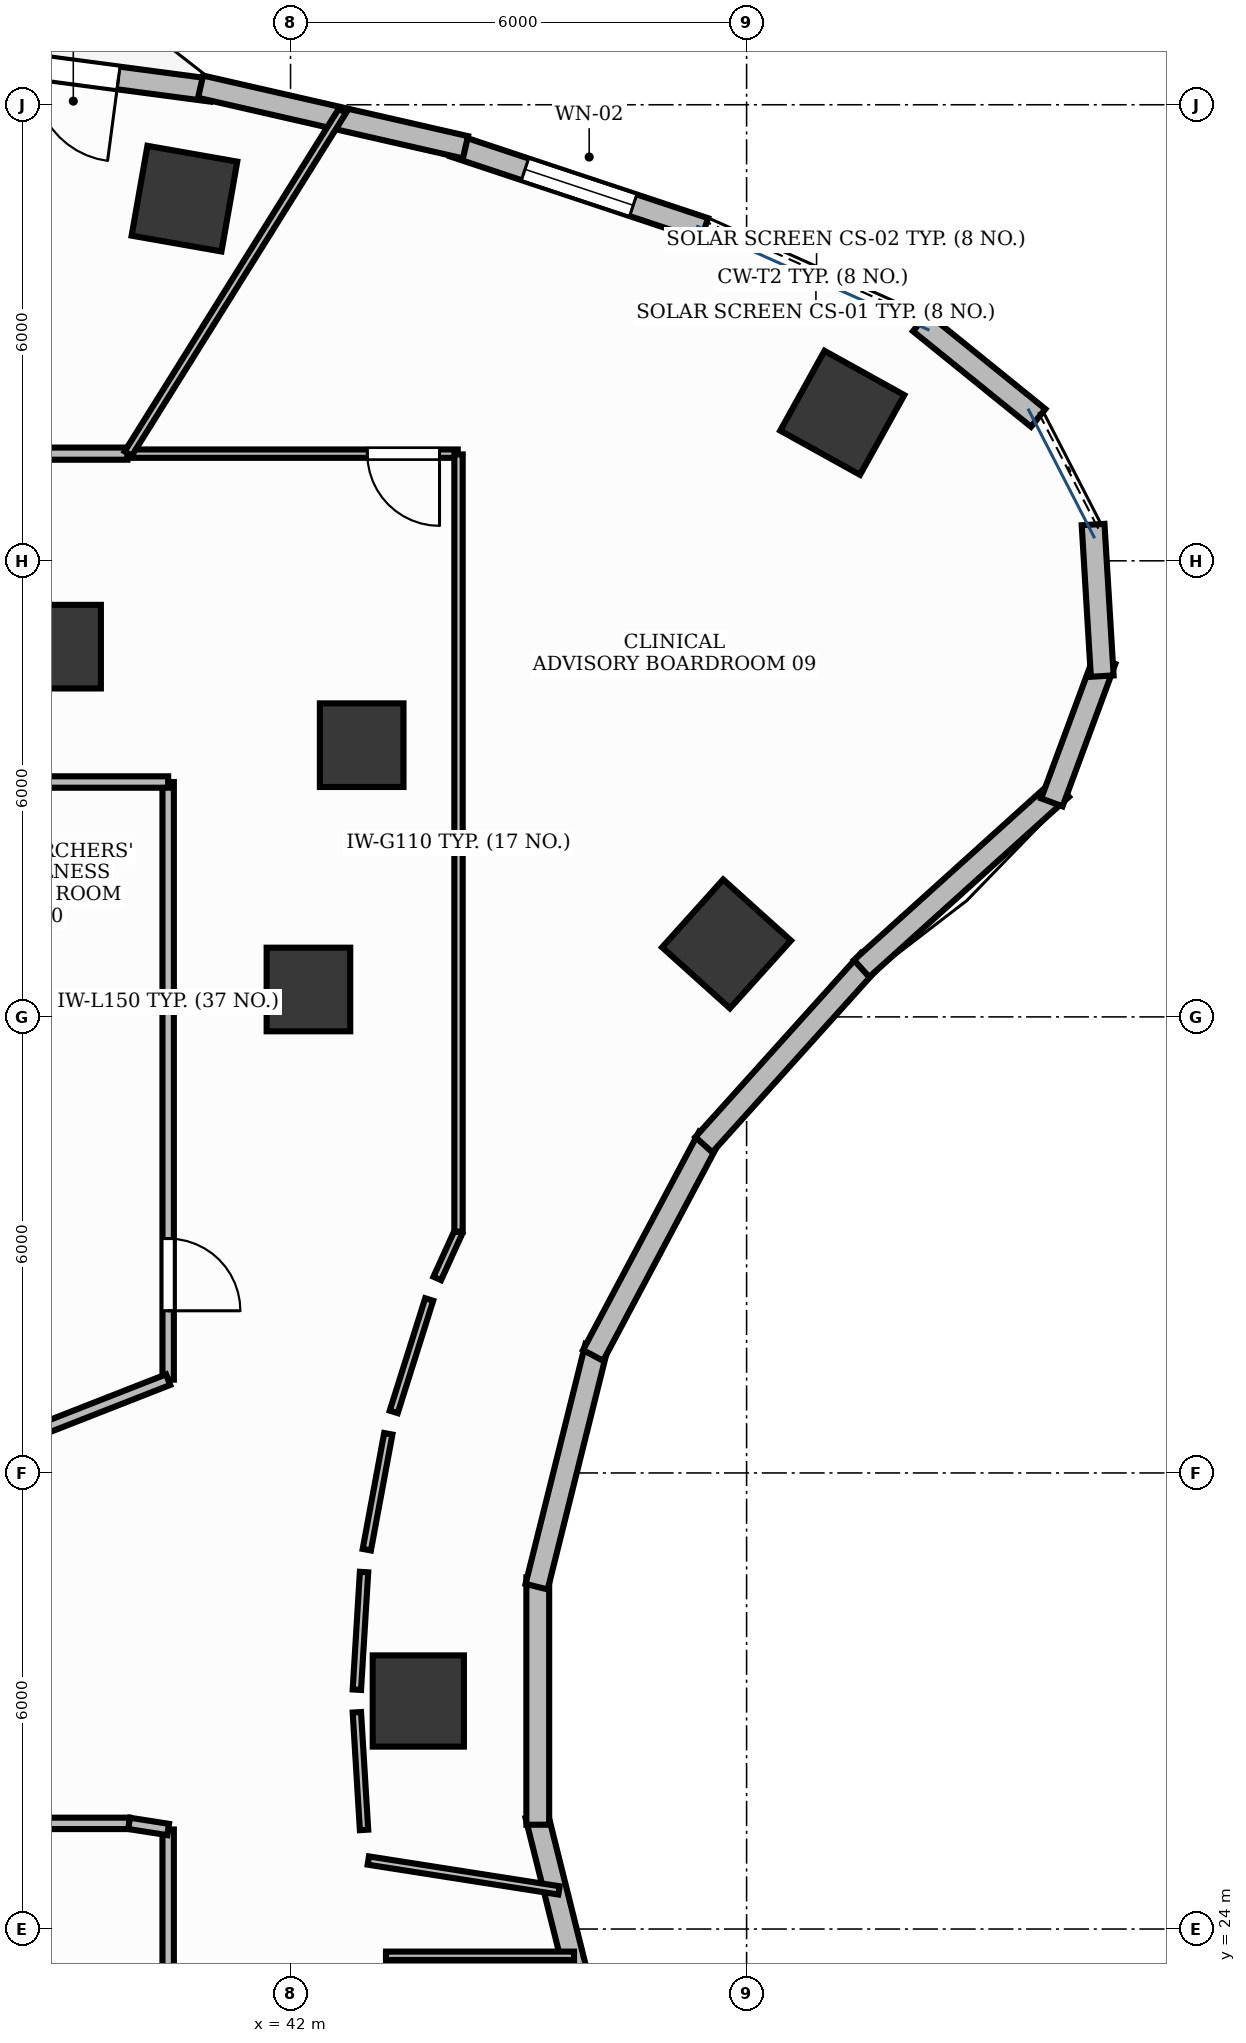
"""IFC4 building model, lengths in metres.
Left out: names, types, materials, properties, quantities, classifications, styles, units other than length and angle.
Written with IfcOpenShell. Run it as: python <this file> out.ifc"""

import sys

from ifc_helpers import new_model, si_unit, direction, frame, frame_2d, origin, origin_2d, place, context, subcontext, project, spatial, rectangle, extrude, element, fill, save


model = new_model("IFC4")
c1 = context("Model", 3, precision=1e-05, world=origin(), true_north=direction((0.0, 1.0)))
c2 = subcontext(c1, "Body", "Model", "MODEL_VIEW")
j1 = project(units=[si_unit("LENGTHUNIT", "METRE"), si_unit("PLANEANGLEUNIT", "RADIAN")], contexts=[c1])
p1 = place(None, origin())
s1 = spatial("IfcSite", under=j1, at=p1, CompositionType="ELEMENT")
p2 = place(p1, origin())
s2 = spatial("IfcBuilding", under=s1, at=p2, CompositionType="ELEMENT")
p3 = place(p2, frame((0.0, 0.0, 115.2)))
s3 = spatial("IfcBuildingStorey", under=s2, at=p3, CompositionType="ELEMENT", Elevation=115.2)
p4 = place(p3, frame((49.259, 43.947, -0.0), z_axis=(0.0, 0.0, 1.0), x_axis=(-0.874535078577, 0.484962262797, 0.0)))
e1 = element("IfcColumn", 1, at=p4, inside=s3, PredefinedType="COLUMN", context=c2, shape_type="SweptSolid", body=[
    extrude(rectangle(XDim=1.2, YDim=1.2, at=origin_2d()), origin(), (0.0, 0.0, 1.0), 3.901),
])
p5 = place(p3, frame((42.936, 39.575, -0.0), z_axis=(0.0, 0.0, 1.0), x_axis=(1.0, 0.0, 0.0)))
e2 = element("IfcColumn", 2, at=p5, inside=s3, PredefinedType="COLUMN", context=c2, shape_type="SweptSolid", body=[
    extrude(rectangle(XDim=1.1, YDim=1.1, at=origin_2d()), origin(), (0.0, 0.0, 1.0), 3.901),
])
p6 = place(p3, frame((40.604, 46.765, -0.0), z_axis=(0.0, 0.0, 1.0), x_axis=(-0.984868307662, 0.173304404339, 0.0)))
e3 = element("IfcColumn", 3, at=p6, inside=s3, PredefinedType="COLUMN", context=c2, shape_type="SweptSolid", body=[
    extrude(rectangle(XDim=1.2, YDim=1.2, at=origin_2d()), origin(), (0.0, 0.0, 1.0), 3.901),
])
p7 = place(p3, frame((38.955, 40.871, -0.0), z_axis=(0.0, 0.0, 1.0), x_axis=(1.0, 0.0, 0.0)))
e4 = element("IfcColumn", 4, at=p7, inside=s3, PredefinedType="COLUMN", context=c2, shape_type="SweptSolid", body=[
    extrude(rectangle(XDim=1.1, YDim=1.1, at=origin_2d()), origin(), (0.0, 0.0, 1.0), 3.901),
])
for number, where, z_axis, x_axis in (
    (5, (43.681, 27.0, -0.0), (0.0, 0.0, 1.0), (0.0, 1.0, 0.0)),
    (6, (47.736, 36.96, -0.0), (0.0, 0.0, 1.0), (0.669, 0.743, 0.0)),
):
    element("IfcColumn", number, at=place(p3, frame(where, z_axis=z_axis, x_axis=x_axis)), inside=s3, PredefinedType="COLUMN", context=c2, shape_type="SweptSolid", body=[
        extrude(rectangle(XDim=1.2, YDim=1.2, at=origin_2d()), origin(), (0.0, 0.0, 1.0), 3.901),
    ])
p8 = place(p3, frame((42.236, 36.361, -0.0), z_axis=(0.0, 0.0, 1.0), x_axis=(1.0, 0.0, 0.0)))
e7 = element("IfcColumn", 7, at=p8, inside=s3, PredefinedType="COLUMN", context=c2, shape_type="SweptSolid", body=[
    extrude(rectangle(XDim=1.1, YDim=1.1, at=origin_2d()), origin(), (0.0, 0.0, 1.0), 3.901),
])
p9 = place(p3, frame((47.446, 46.366, 0.0), z_axis=(0.0, 0.0, 1.0), x_axis=(-0.948949854506, 0.315426970364, 0.0)))
e8 = element("IfcWall", 8, at=p9, inside=s3, PredefinedType="STANDARD", context=c2, shape_type="SweptSolid", body=[
    extrude(rectangle(XDim=3.476, YDim=0.3, at=frame_2d((1.738, 0.0))), origin(), (0.0, 0.0, 1.0), 3.9),
])
p10 = place(p9, frame((0.988, 0.0, 0.95)))
e9 = element("IfcOpeningElement", 9, at=p10, cuts=e8, PredefinedType="OPENING", context=c2, shape_type="SweptSolid", body=[
    extrude(rectangle(XDim=1.5, YDim=1.8, at=frame_2d((0.75, 0.9))), frame((0.0, 0.165, 0.0), z_axis=(0.0, -1.0, 0.0), x_axis=(1.0, 0.0, 0.0)), (0.0, 0.0, 1.0), 0.33),
])
p11 = place(p3, frame((40.964, 48.19, 0.0), z_axis=(0.0, 0.0, 1.0), x_axis=(-0.991369257822, 0.131099178664, 0.0)))
e10 = element("IfcWall", 10, at=p11, inside=s3, PredefinedType="STANDARD", context=c2, shape_type="SweptSolid", body=[
    extrude(rectangle(XDim=3.575, YDim=0.3, at=frame_2d((1.788, 0.0))), origin(), (0.0, 0.0, 1.0), 3.9),
])
p12 = place(p11, frame((1.238, 0.0, 0.0)))
e11 = element("IfcOpeningElement", 11, at=p12, cuts=e10, PredefinedType="OPENING", context=c2, shape_type="SweptSolid", body=[
    extrude(rectangle(XDim=1.1, YDim=2.15, at=frame_2d((0.55, 1.075))), frame((0.0, 0.165, 0.0), z_axis=(0.0, -1.0, 0.0), x_axis=(1.0, 0.0, 0.0)), (0.0, 0.0, 1.0), 0.33),
])
p13 = place(p3, frame((44.302, 47.441, 0.0), z_axis=(0.0, 0.0, 1.0), x_axis=(-0.974841550422, 0.222898971669, 0.0)))
e12 = element("IfcWall", 12, at=p13, inside=s3, PredefinedType="STANDARD", context=c2, shape_type="SweptSolid", body=[
    extrude(rectangle(XDim=3.575, YDim=0.3, at=frame_2d((1.788, 0.0))), origin(), (0.0, 0.0, 1.0), 3.9),
])
p14 = place(p3, frame((46.025, 22.337, 0.0), z_axis=(0.0, 0.0, 1.0), x_axis=(-0.241900409149, 0.970301083197, 0.0)))
e13 = element("IfcWall", 13, at=p14, inside=s3, PredefinedType="STANDARD", context=c2, shape_type="SweptSolid", body=[
    extrude(rectangle(XDim=3.256, YDim=0.3, at=frame_2d((1.628, 0.0))), origin(), (0.0, 0.0, 1.0), 3.9),
])
p15 = place(p3, frame((45.253, 25.372, 0.0), z_axis=(0.0, 0.0, 1.0), x_axis=(0.0, 1.0, 0.0)))
e14 = element("IfcWall", 14, at=p15, inside=s3, PredefinedType="STANDARD", context=c2, shape_type="SweptSolid", body=[
    extrude(rectangle(XDim=3.255, YDim=0.3, at=frame_2d((1.628, 0.0))), origin(), (0.0, 0.0, 1.0), 3.9),
])
p16 = place(p3, frame((45.238, 28.504, 0.0), z_axis=(0.0, 0.0, 1.0), x_axis=(0.241900409149, 0.970301083197, 0.0)))
e15 = element("IfcWall", 15, at=p16, inside=s3, PredefinedType="STANDARD", context=c2, shape_type="SweptSolid", body=[
    extrude(rectangle(XDim=3.256, YDim=0.3, at=frame_2d((1.628, 0.0))), origin(), (0.0, 0.0, 1.0), 3.9),
])
p17 = place(p3, frame((45.98, 31.547, 0.0), z_axis=(0.0, 0.0, 1.0), x_axis=(0.469451284634, 0.882958374645, 0.0)))
e16 = element("IfcWall", 16, at=p17, inside=s3, PredefinedType="STANDARD", context=c2, shape_type="SweptSolid", body=[
    extrude(rectangle(XDim=3.256, YDim=0.3, at=frame_2d((1.628, 0.0))), origin(), (0.0, 0.0, 1.0), 3.9),
])
p18 = place(p3, frame((47.437, 34.319, 0.0), z_axis=(0.0, 0.0, 1.0), x_axis=(0.669167727967, 0.743111399353, 0.0)))
e17 = element("IfcWall", 17, at=p18, inside=s3, PredefinedType="STANDARD", context=c2, shape_type="SweptSolid", body=[
    extrude(rectangle(XDim=3.255, YDim=0.3, at=frame_2d((1.628, 0.0))), origin(), (0.0, 0.0, 1.0), 3.9),
])
p19 = place(p3, frame((49.513, 36.636, 0.0), z_axis=(0.0, 0.0, 1.0), x_axis=(0.74255963233, 0.669779958221, 0.0)))
e18 = element("IfcWall", 18, at=p19, inside=s3, PredefinedType="STANDARD", context=c2, shape_type="SweptSolid", body=[
    extrude(rectangle(XDim=3.539, YDim=0.3, at=frame_2d((1.77, 0.0))), origin(), (0.0, 0.0, 1.0), 3.9),
])
p20 = place(p3, frame((52.016, 38.822, 0.0), z_axis=(0.0, 0.0, 1.0), x_axis=(0.347370087337, 0.937728117539, 0.0)))
e19 = element("IfcWall", 19, at=p20, inside=s3, PredefinedType="STANDARD", context=c2, shape_type="SweptSolid", body=[
    extrude(rectangle(XDim=1.997, YDim=0.3, at=frame_2d((0.999, 0.0))), origin(), (0.0, 0.0, 1.0), 3.9),
])
for number, where, z_axis, x_axis in (
    (20, (52.679, 40.483, 0.0), (0.0, 0.0, 1.0), (-0.06, 0.998, 0.0)),
    (21, (51.836, 43.881, 0.0), (0.0, 0.0, 1.0), (-0.777, 0.629, 0.0)),
):
    element("IfcWall", number, at=place(p3, frame(where, z_axis=z_axis, x_axis=x_axis)), inside=s3, PredefinedType="STANDARD", context=c2, shape_type="SweptSolid", body=[
        extrude(rectangle(XDim=1.998, YDim=0.3, at=frame_2d((0.999, 0.0))), origin(), (0.0, 0.0, 1.0), 3.9),
    ])
p21 = place(p3, frame((40.39, 25.31, 0.0), z_axis=(0.0, 0.0, 1.0), x_axis=(0.0, -1.0, 0.0)))
e22 = element("IfcWall", 22, at=p21, inside=s3, PredefinedType="PARTITIONING", context=c2, shape_type="SweptSolid", body=[
    extrude(rectangle(XDim=5.552, YDim=0.15, at=frame_2d((2.776, 0.0))), origin(), (0.0, 0.0, 1.0), 2.91),
])
p22 = place(p21, frame((1.882, 0.0, 0.0)))
e23 = element("IfcOpeningElement", 23, at=p22, cuts=e22, PredefinedType="OPENING", context=c2, shape_type="SweptSolid", body=[
    extrude(rectangle(XDim=0.95, YDim=2.15, at=frame_2d((0.475, 1.075))), frame((0.0, 0.09, 0.0), z_axis=(0.0, -1.0, 0.0), x_axis=(1.0, 0.0, 0.0)), (0.0, 0.0, 1.0), 0.18),
])
p23 = place(p3, frame((44.2, 43.41, 0.0), z_axis=(0.0, 0.0, 1.0), x_axis=(-1.0, 0.0, 0.0)))
e24 = element("IfcWall", 24, at=p23, inside=s3, PredefinedType="MOVABLE", context=c2, shape_type="SweptSolid", body=[
    extrude(rectangle(XDim=4.336, YDim=0.11, at=frame_2d((2.168, 0.0))), origin(), (0.0, 0.0, 1.0), 2.91),
])
p24 = place(p23, frame((0.24, 0.0, 0.0)))
e25 = element("IfcOpeningElement", 25, at=p24, cuts=e24, PredefinedType="OPENING", context=c2, shape_type="SweptSolid", body=[
    extrude(rectangle(XDim=0.95, YDim=2.15, at=frame_2d((0.475, 1.075))), frame((0.0, 0.07, 0.0), z_axis=(0.0, -1.0, 0.0), x_axis=(1.0, 0.0, 0.0)), (0.0, 0.0, 1.0), 0.14),
])
p25 = place(p3, frame((40.39, 39.09, 0.0), z_axis=(0.0, 0.0, 1.0), x_axis=(0.0, -1.0, 0.0)))
e26 = element("IfcWall", 26, at=p25, inside=s3, PredefinedType="PARTITIONING", context=c2, shape_type="SweptSolid", body=[
    extrude(rectangle(XDim=7.862, YDim=0.15, at=frame_2d((3.931, 0.0))), origin(), (0.0, 0.0, 1.0), 2.91),
])
p26 = place(p25, frame((6.006, 0.0, 0.0)))
e27 = element("IfcOpeningElement", 27, at=p26, cuts=e26, PredefinedType="OPENING", context=c2, shape_type="SweptSolid", body=[
    extrude(rectangle(XDim=0.95, YDim=2.15, at=frame_2d((0.475, 1.075))), frame((0.0, 0.09, 0.0), z_axis=(0.0, -1.0, 0.0), x_axis=(1.0, 0.0, 0.0)), (0.0, 0.0, 1.0), 0.18),
])
p27 = place(p3, frame((39.854, 43.41, 0.0), z_axis=(0.0, 0.0, 1.0), x_axis=(-1.0, 0.0, 0.0)))
e28 = element("IfcWall", 28, at=p27, inside=s3, PredefinedType="PARTITIONING", context=c2, shape_type="SweptSolid", body=[
    extrude(rectangle(XDim=19.812, YDim=0.16, at=frame_2d((9.906, 0.0))), origin(), (0.0, 0.0, 1.0), 2.91),
])
p28 = place(p27, frame((5.642, 0.0, 0.0)))
e29 = element("IfcOpeningElement", 29, at=p28, cuts=e28, PredefinedType="OPENING", context=c2, shape_type="SweptSolid", body=[
    extrude(rectangle(XDim=0.95, YDim=2.15, at=frame_2d((0.475, 1.075))), frame((0.0, 0.095, 0.0), z_axis=(0.0, -1.0, 0.0), x_axis=(1.0, 0.0, 0.0)), (0.0, 0.0, 1.0), 0.19),
])
p29 = place(p3, frame((43.256, 23.648, 0.0), z_axis=(0.0, 0.0, 1.0), x_axis=(1.0, 0.0, 0.0)))
e30 = element("IfcWall", 30, at=p29, inside=s3, PredefinedType="MOVABLE", context=c2, shape_type="SweptSolid", body=[
    extrude(rectangle(XDim=2.474, YDim=0.11, at=frame_2d((1.237, 0.0))), origin(), (0.0, 0.0, 1.0), 2.91),
])
p30 = place(p3, frame((37.502, 25.39, 0.0), z_axis=(0.0, 0.0, 1.0), x_axis=(1.0, 0.0, 0.0)))
e31 = element("IfcWall", 31, at=p30, inside=s3, PredefinedType="PARTITIONING", context=c2, shape_type="SweptSolid", body=[
    extrude(rectangle(XDim=2.374, YDim=0.15, at=frame_2d((1.187, 0.0))), origin(), (0.0, 0.0, 1.0), 2.91),
])
p31 = place(p3, frame((39.876, 25.39, 0.0), z_axis=(0.0, 0.0, 1.0), x_axis=(0.988005321265, -0.15441983406, 0.0)))
e32 = element("IfcWall", 32, at=p31, inside=s3, PredefinedType="PARTITIONING", context=c2, shape_type="SweptSolid", body=[
    extrude(rectangle(XDim=0.52, YDim=0.15, at=frame_2d((0.26, 0.0))), origin(), (0.0, 0.0, 1.0), 2.91),
])
p32 = place(p3, frame((45.532, 24.508, 0.0), z_axis=(0.0, 0.0, 1.0), x_axis=(-0.987957888296, 0.154723013653, 0.0)))
e33 = element("IfcWall", 33, at=p32, inside=s3, PredefinedType="MOVABLE", context=c2, shape_type="SweptSolid", body=[
    extrude(rectangle(XDim=2.539, YDim=0.11, at=frame_2d((1.27, 0.0))), origin(), (0.0, 0.0, 1.0), 2.91),
])
for number, where, z_axis, x_axis in (
    (34, (42.967, 25.304, 0.0), (0.0, 0.0, 1.0), (-0.061, 0.998, 0.0)),
    (35, (42.873, 27.149, 0.0), (0.0, 0.0, 1.0), (0.061, 0.998, 0.0)),
):
    element("IfcWall", number, at=place(p3, frame(where, z_axis=z_axis, x_axis=x_axis)), inside=s3, PredefinedType="MOVABLE", context=c2, shape_type="SweptSolid", body=[
        extrude(rectangle(XDim=1.55, YDim=0.11, at=frame_2d((0.775, 0.0))), origin(), (0.0, 0.0, 1.0), 2.91),
    ])
p33 = place(p3, frame((43.003, 28.991, 0.0), z_axis=(0.0, 0.0, 1.0), x_axis=(0.182168192784, 0.983267384559, 0.0)))
e36 = element("IfcWall", 36, at=p33, inside=s3, PredefinedType="MOVABLE", context=c2, shape_type="SweptSolid", body=[
    extrude(rectangle(XDim=1.551, YDim=0.11, at=frame_2d((0.775, 0.0))), origin(), (0.0, 0.0, 1.0), 2.91),
])
p34 = place(p3, frame((43.358, 30.803, 0.0), z_axis=(0.0, 0.0, 1.0), x_axis=(0.300641414783, 0.953737248783, 0.0)))
e37 = element("IfcWall", 37, at=p34, inside=s3, PredefinedType="MOVABLE", context=c2, shape_type="SweptSolid", body=[
    extrude(rectangle(XDim=1.55, YDim=0.11, at=frame_2d((0.775, 0.0))), origin(), (0.0, 0.0, 1.0), 2.91),
])
p35 = place(p3, frame((43.93, 32.559, 0.0), z_axis=(0.0, 0.0, 1.0), x_axis=(0.414377467152, 0.910105111905, 0.0)))
e38 = element("IfcWall", 38, at=p35, inside=s3, PredefinedType="MOVABLE", context=c2, shape_type="SweptSolid", body=[
    extrude(rectangle(XDim=0.672, YDim=0.11, at=frame_2d((0.336, 0.0))), origin(), (0.0, 0.0, 1.0), 2.91),
])
p36 = place(p3, frame((44.21, 33.175, 0.0), z_axis=(0.0, 0.0, 1.0), x_axis=(0.0, 1.0, 0.0)))
e39 = element("IfcWall", 39, at=p36, inside=s3, PredefinedType="MOVABLE", context=c2, shape_type="SweptSolid", body=[
    extrude(rectangle(XDim=10.225, YDim=0.11, at=frame_2d((5.112, 0.0))), origin(), (0.0, 0.0, 1.0), 2.91),
])
p37 = place(p3, frame((39.864, 43.41, 0.0), z_axis=(0.0, 0.0, 1.0), x_axis=(0.529928772796, 0.848042154473, 0.0)))
e40 = element("IfcWall", 40, at=p37, inside=s3, PredefinedType="MOVABLE", context=c2, shape_type="SweptSolid", body=[
    extrude(rectangle(XDim=5.317, YDim=0.11, at=frame_2d((2.658, 0.0))), origin(), (0.0, 0.0, 1.0), 2.91),
])
p38 = place(p3, frame((37.21, 39.09, 0.0), z_axis=(0.0, 0.0, 1.0), x_axis=(1.0, 0.0, 0.0)))
e41 = element("IfcWall", 41, at=p38, inside=s3, PredefinedType="PARTITIONING", context=c2, shape_type="SweptSolid", body=[
    extrude(rectangle(XDim=3.18, YDim=0.15, at=frame_2d((1.59, 0.0))), origin(), (0.0, 0.0, 1.0), 2.91),
])
p39 = place(p3, frame((40.39, 31.228, 0.0), z_axis=(0.0, 0.0, 1.0), x_axis=(-0.931038232899, -0.364921647592, 0.0)))
e42 = element("IfcWall", 42, at=p39, inside=s3, PredefinedType="PARTITIONING", context=c2, shape_type="SweptSolid", body=[
    extrude(rectangle(XDim=3.102, YDim=0.15, at=frame_2d((1.551, 0.0))), origin(), (0.0, 0.0, 1.0), 2.91),
])
p40 = place(p10, origin())
e43 = element("IfcWindow", 43, at=p40, inside=s3, PartitioningType="DOUBLE_PANEL_VERTICAL", PredefinedType="WINDOW", context=c2, shape_type="SweptSolid", body=[
    extrude(rectangle(XDim=1.5, YDim=1.8, at=frame_2d((0.75, 0.9))), frame((0.0, 0.03, 0.0), z_axis=(0.0, -1.0, 0.0), x_axis=(1.0, 0.0, 0.0)), (0.0, 0.0, 1.0), 0.06),
])
fill(e9, e43)
p41 = place(p12, origin())
e44 = element("IfcDoor", 44, at=p41, inside=s3, OperationType="SINGLE_SWING_LEFT", PredefinedType="DOOR", context=c2, shape_type="SweptSolid", body=[
    extrude(rectangle(XDim=1.1, YDim=2.15, at=frame_2d((0.55, 1.075))), frame((0.0, 0.025, 0.0), z_axis=(0.0, -1.0, 0.0), x_axis=(1.0, 0.0, 0.0)), (0.0, 0.0, 1.0), 0.05),
])
fill(e11, e44)
p42 = place(p24, origin())
e45 = element("IfcDoor", 45, at=p42, inside=s3, OperationType="SINGLE_SWING_LEFT", PredefinedType="DOOR", context=c2, shape_type="SweptSolid", body=[
    extrude(rectangle(XDim=0.95, YDim=2.15, at=frame_2d((0.475, 1.075))), frame((0.0, 0.025, 0.0), z_axis=(0.0, -1.0, 0.0), x_axis=(1.0, 0.0, 0.0)), (0.0, 0.0, 1.0), 0.05),
])
fill(e25, e45)
p43 = place(p26, origin())
e46 = element("IfcDoor", 46, at=p43, inside=s3, OperationType="SINGLE_SWING_RIGHT", PredefinedType="DOOR", context=c2, shape_type="SweptSolid", body=[
    extrude(rectangle(XDim=0.95, YDim=2.15, at=frame_2d((0.475, 1.075))), frame((0.0, 0.025, 0.0), z_axis=(0.0, -1.0, 0.0), x_axis=(1.0, 0.0, 0.0)), (0.0, 0.0, 1.0), 0.05),
])
fill(e27, e46)
save(model, sys.argv[1])
